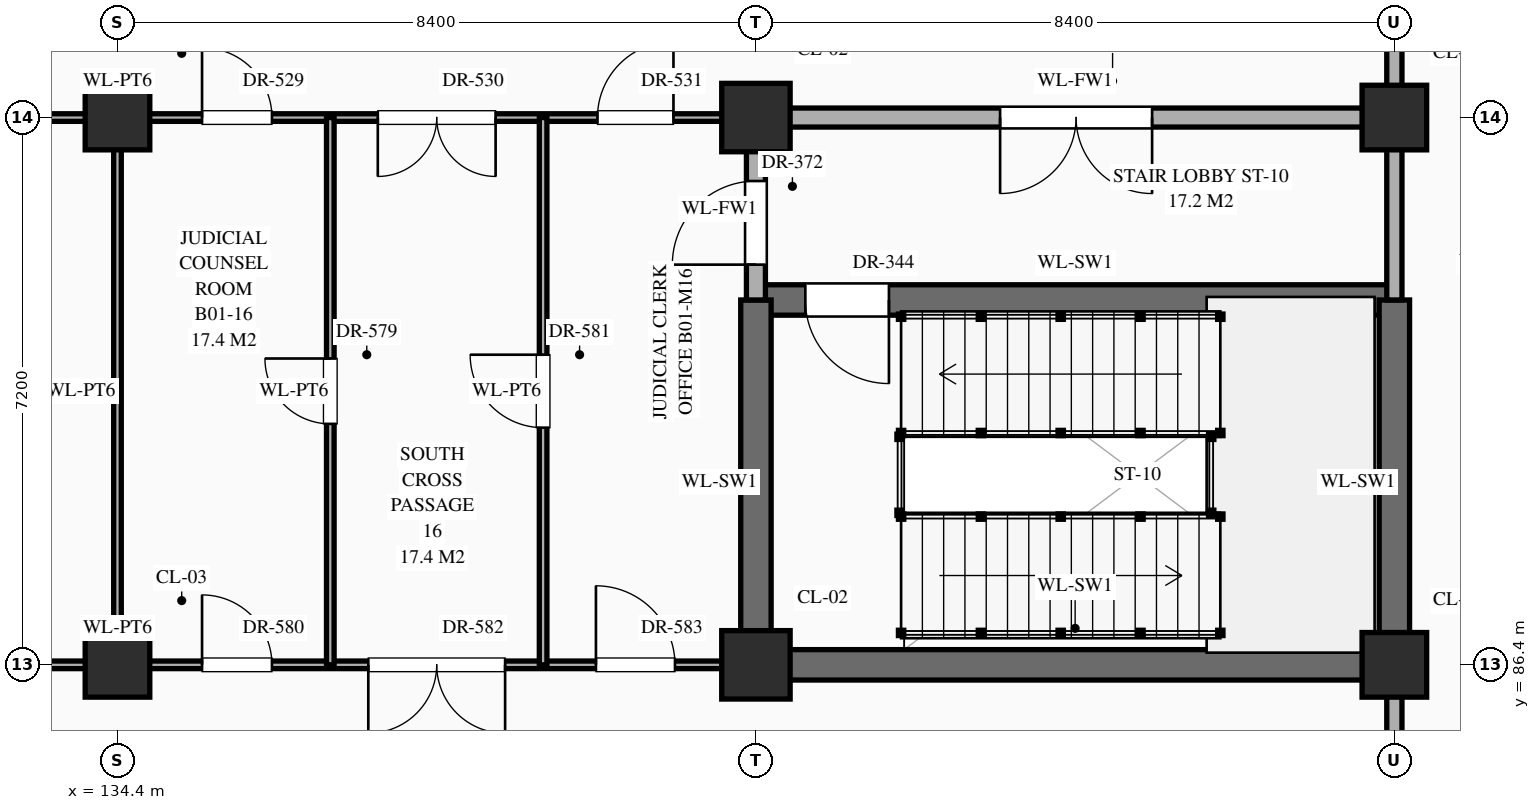
"""IFC4 building model, lengths in metres.
Left out: names, types, materials, properties, quantities, classifications, styles, units other than length and angle.
Written with IfcOpenShell. Run it as: python <this file> out.ifc"""

import sys

from ifc_helpers import new_model, si_unit, direction, frame, frame_2d, origin, origin_2d, place, context, subcontext, project, spatial, rectangle, extrude, element, fill, save


model = new_model("IFC4")
c1 = context("Model", 3, precision=1e-05, world=origin(), true_north=direction((0.0, 1.0)))
c2 = subcontext(c1, "Body", "Model", "MODEL_VIEW")
j1 = project(units=[si_unit("LENGTHUNIT", "METRE"), si_unit("PLANEANGLEUNIT", "RADIAN")], contexts=[c1])
p1 = place(None, origin())
s1 = spatial("IfcSite", under=j1, at=p1, CompositionType="ELEMENT")
p2 = place(p1, origin())
s2 = spatial("IfcBuilding", under=s1, at=p2, CompositionType="ELEMENT")
p3 = place(p2, frame((0.0, 0.0, -5.4)))
s3 = spatial("IfcBuildingStorey", under=s2, at=p3, CompositionType="ELEMENT", Elevation=-5.4)
for number, where, z_axis, x_axis in (
    (1, (134.4, 86.4, 0.0), (0.0, 0.0, 1.0), (1.0, 0.0, 0.0)),
    (2, (134.4, 93.6, 0.0), (0.0, 0.0, 1.0), (1.0, 0.0, 0.0)),
):
    element("IfcColumn", number, at=place(p3, frame(where, z_axis=z_axis, x_axis=x_axis)), inside=s3, PredefinedType="COLUMN", context=c2, shape_type="SweptSolid", body=[
        extrude(rectangle(XDim=0.85, YDim=0.85, at=origin_2d()), origin(), (0.0, 0.0, 1.0), 5.4),
    ])
for number, where, z_axis, x_axis in (
    (3, (142.8, 86.4, 0.0), (0.0, 0.0, 1.0), (1.0, 0.0, 0.0)),
    (4, (142.8, 93.6, 0.0), (0.0, 0.0, 1.0), (1.0, 0.0, 0.0)),
):
    element("IfcColumn", number, at=place(p3, frame(where, z_axis=z_axis, x_axis=x_axis)), inside=s3, PredefinedType="COLUMN", context=c2, shape_type="SweptSolid", body=[
        extrude(rectangle(XDim=0.9, YDim=0.9, at=origin_2d()), origin(), (0.0, 0.0, 1.0), 5.4),
    ])
for number, where, z_axis, x_axis in (
    (5, (151.2, 86.4, 0.0), (0.0, 0.0, 1.0), (1.0, 0.0, 0.0)),
    (6, (151.2, 93.6, 0.0), (0.0, 0.0, 1.0), (1.0, 0.0, 0.0)),
):
    element("IfcColumn", number, at=place(p3, frame(where, z_axis=z_axis, x_axis=x_axis)), inside=s3, PredefinedType="COLUMN", context=c2, shape_type="SweptSolid", body=[
        extrude(rectangle(XDim=0.85, YDim=0.85, at=origin_2d()), origin(), (0.0, 0.0, 1.0), 5.4),
    ])
p4 = place(p3, frame((126.0, 86.4, 0.0), z_axis=(0.0, 0.0, 1.0), x_axis=(1.0, 0.0, 0.0)))
e7 = element("IfcWall", 7, at=p4, inside=s3, PredefinedType="STANDARD", context=c2, shape_type="SweptSolid", body=[
    extrude(rectangle(XDim=16.8, YDim=0.1, at=frame_2d((8.4, 0.0))), origin(), (0.0, 0.0, 1.0), 4.25),
])
p5 = place(p4, frame((3.762, 0.0, 0.0)))
e8 = element("IfcOpeningElement", 8, at=p5, cuts=e7, PredefinedType="OPENING", context=c2, shape_type="SweptSolid", body=[
    extrude(rectangle(XDim=0.9, YDim=2.15, at=frame_2d((0.45, 1.075))), frame((0.0, 0.062, 0.0), z_axis=(0.0, -1.0, 0.0), x_axis=(1.0, 0.0, 0.0)), (0.0, 0.0, 1.0), 0.124),
])
p6 = place(p4, frame((9.512, 0.0, 0.0)))
e9 = element("IfcOpeningElement", 9, at=p6, cuts=e7, PredefinedType="OPENING", context=c2, shape_type="SweptSolid", body=[
    extrude(rectangle(XDim=0.92, YDim=2.15, at=frame_2d((0.46, 1.075))), frame((0.0, 0.062, 0.0), z_axis=(0.0, -1.0, 0.0), x_axis=(1.0, 0.0, 0.0)), (0.0, 0.0, 1.0), 0.124),
])
p7 = place(p4, frame((11.7, 0.0, 0.0)))
e10 = element("IfcOpeningElement", 10, at=p7, cuts=e7, PredefinedType="OPENING", context=c2, shape_type="SweptSolid", body=[
    extrude(rectangle(XDim=1.8, YDim=2.5, at=frame_2d((0.9, 1.25))), frame((0.0, 0.062, 0.0), z_axis=(0.0, -1.0, 0.0), x_axis=(1.0, 0.0, 0.0)), (0.0, 0.0, 1.0), 0.124),
])
p8 = place(p4, frame((14.695, 0.0, 0.0)))
e11 = element("IfcOpeningElement", 11, at=p8, cuts=e7, PredefinedType="OPENING", context=c2, shape_type="SweptSolid", body=[
    extrude(rectangle(XDim=1.04, YDim=2.2, at=frame_2d((0.52, 1.1))), frame((0.0, 0.062, 0.0), z_axis=(0.0, -1.0, 0.0), x_axis=(1.0, 0.0, 0.0)), (0.0, 0.0, 1.0), 0.124),
])
p9 = place(p3, frame((142.8, 86.4, 0.0), z_axis=(0.0, 0.0, 1.0), x_axis=(1.0, 0.0, 0.0)))
e12 = element("IfcWall", 12, at=p9, inside=s3, PredefinedType="SHEAR", context=c2, shape_type="SweptSolid", body=[
    extrude(rectangle(XDim=8.4, YDim=0.4, at=frame_2d((4.2, 0.0))), origin(), (0.0, 0.0, 1.0), 5.1),
])
p10 = place(p3, frame((142.8, 91.2, 0.0), z_axis=(0.0, 0.0, 1.0), x_axis=(1.0, 0.0, 0.0)))
e13 = element("IfcWall", 13, at=p10, inside=s3, PredefinedType="SHEAR", context=c2, shape_type="SweptSolid", body=[
    extrude(rectangle(XDim=8.4, YDim=0.4, at=frame_2d((4.2, 0.0))), origin(), (0.0, 0.0, 1.0), 5.1),
])
p11 = place(p10, frame((0.65, 0.0, 0.0)))
e14 = element("IfcOpeningElement", 14, at=p11, cuts=e13, PredefinedType="OPENING", context=c2, shape_type="SweptSolid", body=[
    extrude(rectangle(XDim=1.1, YDim=2.2, at=frame_2d((0.55, 1.1))), frame((0.0, 0.212, 0.0), z_axis=(0.0, -1.0, 0.0), x_axis=(1.0, 0.0, 0.0)), (0.0, 0.0, 1.0), 0.424),
])
p12 = place(p3, frame((126.0, 93.6, 0.0), z_axis=(0.0, 0.0, 1.0), x_axis=(1.0, 0.0, 0.0)))
e15 = element("IfcWall", 15, at=p12, inside=s3, PredefinedType="STANDARD", context=c2, shape_type="SweptSolid", body=[
    extrude(rectangle(XDim=16.8, YDim=0.1, at=frame_2d((8.4, 0.0))), origin(), (0.0, 0.0, 1.0), 4.25),
])
p13 = place(p12, frame((3.782, 0.0, 0.0)))
e16 = element("IfcOpeningElement", 16, at=p13, cuts=e15, PredefinedType="OPENING", context=c2, shape_type="SweptSolid", body=[
    extrude(rectangle(XDim=0.86, YDim=2.1, at=frame_2d((0.43, 1.05))), frame((0.0, 0.062, 0.0), z_axis=(0.0, -1.0, 0.0), x_axis=(1.0, 0.0, 0.0)), (0.0, 0.0, 1.0), 0.124),
])
p14 = place(p12, frame((9.512, 0.0, 0.0)))
e17 = element("IfcOpeningElement", 17, at=p14, cuts=e15, PredefinedType="OPENING", context=c2, shape_type="SweptSolid", body=[
    extrude(rectangle(XDim=0.92, YDim=2.15, at=frame_2d((0.46, 1.075))), frame((0.0, 0.062, 0.0), z_axis=(0.0, -1.0, 0.0), x_axis=(1.0, 0.0, 0.0)), (0.0, 0.0, 1.0), 0.124),
])
p15 = place(p12, frame((11.825, 0.0, 0.0)))
e18 = element("IfcOpeningElement", 18, at=p15, cuts=e15, PredefinedType="OPENING", context=c2, shape_type="SweptSolid", body=[
    extrude(rectangle(XDim=1.55, YDim=2.35, at=frame_2d((0.775, 1.175))), frame((0.0, 0.062, 0.0), z_axis=(0.0, -1.0, 0.0), x_axis=(1.0, 0.0, 0.0)), (0.0, 0.0, 1.0), 0.124),
])
p16 = place(p12, frame((14.715, 0.0, 0.0)))
e19 = element("IfcOpeningElement", 19, at=p16, cuts=e15, PredefinedType="OPENING", context=c2, shape_type="SweptSolid", body=[
    extrude(rectangle(XDim=1.0, YDim=2.25, at=frame_2d((0.5, 1.125))), frame((0.0, 0.062, 0.0), z_axis=(0.0, -1.0, 0.0), x_axis=(1.0, 0.0, 0.0)), (0.0, 0.0, 1.0), 0.124),
])
p17 = place(p3, frame((142.8, 93.6, 0.0), z_axis=(0.0, 0.0, 1.0), x_axis=(1.0, 0.0, 0.0)))
e20 = element("IfcWall", 20, at=p17, inside=s3, PredefinedType="STANDARD", context=c2, shape_type="SweptSolid", body=[
    extrude(rectangle(XDim=8.4, YDim=0.25, at=frame_2d((4.2, 0.0))), origin(), (0.0, 0.0, 1.0), 4.25),
])
p18 = place(p17, frame((3.212, 0.0, 0.0)))
e21 = element("IfcOpeningElement", 21, at=p18, cuts=e20, PredefinedType="OPENING", context=c2, shape_type="SweptSolid", body=[
    extrude(rectangle(XDim=2.0, YDim=2.4, at=frame_2d((1.0, 1.2))), frame((0.0, 0.137, 0.0), z_axis=(0.0, -1.0, 0.0), x_axis=(1.0, 0.0, 0.0)), (0.0, 0.0, 1.0), 0.274),
])
p19 = place(p3, frame((134.4, 86.4, 0.0), z_axis=(0.0, 0.0, 1.0), x_axis=(0.0, 1.0, 0.0)))
e22 = element("IfcWall", 22, at=p19, inside=s3, PredefinedType="STANDARD", context=c2, shape_type="SweptSolid", body=[
    extrude(rectangle(XDim=7.2, YDim=0.1, at=frame_2d((3.6, 0.0))), origin(), (0.0, 0.0, 1.0), 4.35),
])
p20 = place(p3, frame((137.2, 86.4, 0.0), z_axis=(0.0, 0.0, 1.0), x_axis=(0.0, 1.0, 0.0)))
e23 = element("IfcWall", 23, at=p20, inside=s3, PredefinedType="STANDARD", context=c2, shape_type="SweptSolid", body=[
    extrude(rectangle(XDim=7.2, YDim=0.1, at=frame_2d((3.6, 0.0))), origin(), (0.0, 0.0, 1.0), 5.1),
])
p21 = place(p20, frame((3.17, 0.0, 0.0)))
e24 = element("IfcOpeningElement", 24, at=p21, cuts=e23, PredefinedType="OPENING", context=c2, shape_type="SweptSolid", body=[
    extrude(rectangle(XDim=0.86, YDim=2.1, at=frame_2d((0.43, 1.05))), frame((0.0, 0.062, 0.0), z_axis=(0.0, -1.0, 0.0), x_axis=(1.0, 0.0, 0.0)), (0.0, 0.0, 1.0), 0.124),
])
p22 = place(p3, frame((140.0, 86.4, 0.0), z_axis=(0.0, 0.0, 1.0), x_axis=(0.0, 1.0, 0.0)))
e25 = element("IfcWall", 25, at=p22, inside=s3, PredefinedType="STANDARD", context=c2, shape_type="SweptSolid", body=[
    extrude(rectangle(XDim=7.2, YDim=0.1, at=frame_2d((3.6, 0.0))), origin(), (0.0, 0.0, 1.0), 5.1),
])
p23 = place(p22, frame((3.12, 0.0, 0.0)))
e26 = element("IfcOpeningElement", 26, at=p23, cuts=e25, PredefinedType="OPENING", context=c2, shape_type="SweptSolid", body=[
    extrude(rectangle(XDim=0.96, YDim=2.2, at=frame_2d((0.48, 1.1))), frame((0.0, 0.062, 0.0), z_axis=(0.0, -1.0, 0.0), x_axis=(1.0, 0.0, 0.0)), (0.0, 0.0, 1.0), 0.124),
])
p24 = place(p3, frame((142.8, 86.4, 0.0), z_axis=(0.0, 0.0, 1.0), x_axis=(0.0, 1.0, 0.0)))
e27 = element("IfcWall", 27, at=p24, inside=s3, PredefinedType="SHEAR", context=c2, shape_type="SweptSolid", body=[
    extrude(rectangle(XDim=4.8, YDim=0.4, at=frame_2d((2.4, 0.0))), origin(), (0.0, 0.0, 1.0), 5.1),
])
p25 = place(p3, frame((142.8, 91.2, 0.0), z_axis=(0.0, 0.0, 1.0), x_axis=(0.0, 1.0, 0.0)))
e28 = element("IfcWall", 28, at=p25, inside=s3, PredefinedType="STANDARD", context=c2, shape_type="SweptSolid", body=[
    extrude(rectangle(XDim=2.4, YDim=0.25, at=frame_2d((1.2, 0.0))), origin(), (0.0, 0.0, 1.0), 4.35),
])
p26 = place(p25, frame((0.465, 0.0, 0.0)))
e29 = element("IfcOpeningElement", 29, at=p26, cuts=e28, PredefinedType="OPENING", context=c2, shape_type="SweptSolid", body=[
    extrude(rectangle(XDim=1.1, YDim=2.2, at=frame_2d((0.55, 1.1))), frame((0.0, 0.137, 0.0), z_axis=(0.0, -1.0, 0.0), x_axis=(1.0, 0.0, 0.0)), (0.0, 0.0, 1.0), 0.274),
])
p27 = place(p3, frame((151.2, 64.8, 0.0), z_axis=(0.0, 0.0, 1.0), x_axis=(0.0, 1.0, 0.0)))
e30 = element("IfcWall", 30, at=p27, inside=s3, PredefinedType="STANDARD", context=c2, shape_type="SweptSolid", body=[
    extrude(rectangle(XDim=21.6, YDim=0.2, at=frame_2d((10.8, 0.0))), origin(), (0.0, 0.0, 1.0), 4.23),
])
p28 = place(p3, frame((151.2, 86.4, 0.0), z_axis=(0.0, 0.0, 1.0), x_axis=(0.0, 1.0, 0.0)))
e31 = element("IfcWall", 31, at=p28, inside=s3, PredefinedType="SHEAR", context=c2, shape_type="SweptSolid", body=[
    extrude(rectangle(XDim=4.8, YDim=0.4, at=frame_2d((2.4, 0.0))), origin(), (0.0, 0.0, 1.0), 5.1),
])
p29 = place(p3, frame((151.2, 91.2, 0.0), z_axis=(0.0, 0.0, 1.0), x_axis=(0.0, 1.0, 0.0)))
e32 = element("IfcWall", 32, at=p29, inside=s3, PredefinedType="STANDARD", context=c2, shape_type="SweptSolid", body=[
    extrude(rectangle(XDim=16.8, YDim=0.2, at=frame_2d((8.4, 0.0))), origin(), (0.0, 0.0, 1.0), 4.35),
])
p30 = place(p11, frame((1.1, 0.0, 0.0), z_axis=(0.0, 0.0, 1.0), x_axis=(-1.0, 0.0, 0.0)))
e33 = element("IfcDoor", 33, at=p30, inside=s3, OperationType="SINGLE_SWING_LEFT", PredefinedType="DOOR", context=c2, shape_type="SweptSolid", body=[
    extrude(rectangle(XDim=1.1, YDim=2.2, at=frame_2d((0.55, 1.1))), frame((0.0, 0.025, 0.0), z_axis=(0.0, -1.0, 0.0), x_axis=(1.0, 0.0, 0.0)), (0.0, 0.0, 1.0), 0.05),
])
fill(e14, e33)
p31 = place(p18, frame((2.0, 0.0, 0.0), z_axis=(0.0, 0.0, 1.0), x_axis=(-1.0, 0.0, 0.0)))
e34 = element("IfcDoor", 34, at=p31, inside=s3, OperationType="DOUBLE_DOOR_SINGLE_SWING", PredefinedType="DOOR", context=c2, shape_type="SweptSolid", body=[
    extrude(rectangle(XDim=2.0, YDim=2.4, at=frame_2d((1.0, 1.2))), frame((0.0, 0.025, 0.0), z_axis=(0.0, -1.0, 0.0), x_axis=(1.0, 0.0, 0.0)), (0.0, 0.0, 1.0), 0.05),
])
fill(e21, e34)
p32 = place(p26, origin())
e35 = element("IfcDoor", 35, at=p32, inside=s3, OperationType="SINGLE_SWING_LEFT", PredefinedType="DOOR", context=c2, shape_type="SweptSolid", body=[
    extrude(rectangle(XDim=1.1, YDim=2.2, at=frame_2d((0.55, 1.1))), frame((0.0, 0.025, 0.0), z_axis=(0.0, -1.0, 0.0), x_axis=(1.0, 0.0, 0.0)), (0.0, 0.0, 1.0), 0.05),
])
fill(e29, e35)
p33 = place(p14, origin())
e36 = element("IfcDoor", 36, at=p33, inside=s3, OperationType="SINGLE_SWING_LEFT", PredefinedType="DOOR", context=c2, shape_type="SweptSolid", body=[
    extrude(rectangle(XDim=0.92, YDim=2.15, at=frame_2d((0.46, 1.075))), frame((0.0, 0.025, 0.0), z_axis=(0.0, -1.0, 0.0), x_axis=(1.0, 0.0, 0.0)), (0.0, 0.0, 1.0), 0.05),
])
fill(e17, e36)
p34 = place(p15, frame((1.55, 0.0, 0.0), z_axis=(0.0, 0.0, 1.0), x_axis=(-1.0, 0.0, 0.0)))
e37 = element("IfcDoor", 37, at=p34, inside=s3, OperationType="DOUBLE_DOOR_SINGLE_SWING", PredefinedType="DOOR", context=c2, shape_type="SweptSolid", body=[
    extrude(rectangle(XDim=1.55, YDim=2.35, at=frame_2d((0.775, 1.175))), frame((0.0, 0.025, 0.0), z_axis=(0.0, -1.0, 0.0), x_axis=(1.0, 0.0, 0.0)), (0.0, 0.0, 1.0), 0.05),
])
fill(e18, e37)
p35 = place(p16, origin())
e38 = element("IfcDoor", 38, at=p35, inside=s3, OperationType="SINGLE_SWING_RIGHT", PredefinedType="DOOR", context=c2, shape_type="SweptSolid", body=[
    extrude(rectangle(XDim=1.0, YDim=2.25, at=frame_2d((0.5, 1.125))), frame((0.0, 0.025, 0.0), z_axis=(0.0, -1.0, 0.0), x_axis=(1.0, 0.0, 0.0)), (0.0, 0.0, 1.0), 0.05),
])
fill(e19, e38)
p36 = place(p21, origin())
e39 = element("IfcDoor", 39, at=p36, inside=s3, OperationType="SINGLE_SWING_RIGHT", PredefinedType="DOOR", context=c2, shape_type="SweptSolid", body=[
    extrude(rectangle(XDim=0.86, YDim=2.1, at=frame_2d((0.43, 1.05))), frame((0.0, 0.025, 0.0), z_axis=(0.0, -1.0, 0.0), x_axis=(1.0, 0.0, 0.0)), (0.0, 0.0, 1.0), 0.05),
])
fill(e24, e39)
p37 = place(p6, origin())
e40 = element("IfcDoor", 40, at=p37, inside=s3, OperationType="SINGLE_SWING_LEFT", PredefinedType="DOOR", context=c2, shape_type="SweptSolid", body=[
    extrude(rectangle(XDim=0.92, YDim=2.15, at=frame_2d((0.46, 1.075))), frame((0.0, 0.025, 0.0), z_axis=(0.0, -1.0, 0.0), x_axis=(1.0, 0.0, 0.0)), (0.0, 0.0, 1.0), 0.05),
])
fill(e9, e40)
p38 = place(p23, origin())
e41 = element("IfcDoor", 41, at=p38, inside=s3, OperationType="SINGLE_SWING_RIGHT", PredefinedType="DOOR", context=c2, shape_type="SweptSolid", body=[
    extrude(rectangle(XDim=0.96, YDim=2.2, at=frame_2d((0.48, 1.1))), frame((0.0, 0.025, 0.0), z_axis=(0.0, -1.0, 0.0), x_axis=(1.0, 0.0, 0.0)), (0.0, 0.0, 1.0), 0.05),
])
fill(e26, e41)
p39 = place(p7, frame((1.8, 0.0, 0.0), z_axis=(0.0, 0.0, 1.0), x_axis=(-1.0, 0.0, 0.0)))
e42 = element("IfcDoor", 42, at=p39, inside=s3, OperationType="DOUBLE_DOOR_SINGLE_SWING", PredefinedType="DOOR", context=c2, shape_type="SweptSolid", body=[
    extrude(rectangle(XDim=1.8, YDim=2.5, at=frame_2d((0.9, 1.25))), frame((0.0, 0.025, 0.0), z_axis=(0.0, -1.0, 0.0), x_axis=(1.0, 0.0, 0.0)), (0.0, 0.0, 1.0), 0.05),
])
fill(e10, e42)
p40 = place(p8, origin())
e43 = element("IfcDoor", 43, at=p40, inside=s3, OperationType="SINGLE_SWING_LEFT", PredefinedType="DOOR", context=c2, shape_type="SweptSolid", body=[
    extrude(rectangle(XDim=1.04, YDim=2.2, at=frame_2d((0.52, 1.1))), frame((0.0, 0.025, 0.0), z_axis=(0.0, -1.0, 0.0), x_axis=(1.0, 0.0, 0.0)), (0.0, 0.0, 1.0), 0.05),
])
fill(e11, e43)
save(model, sys.argv[1])
